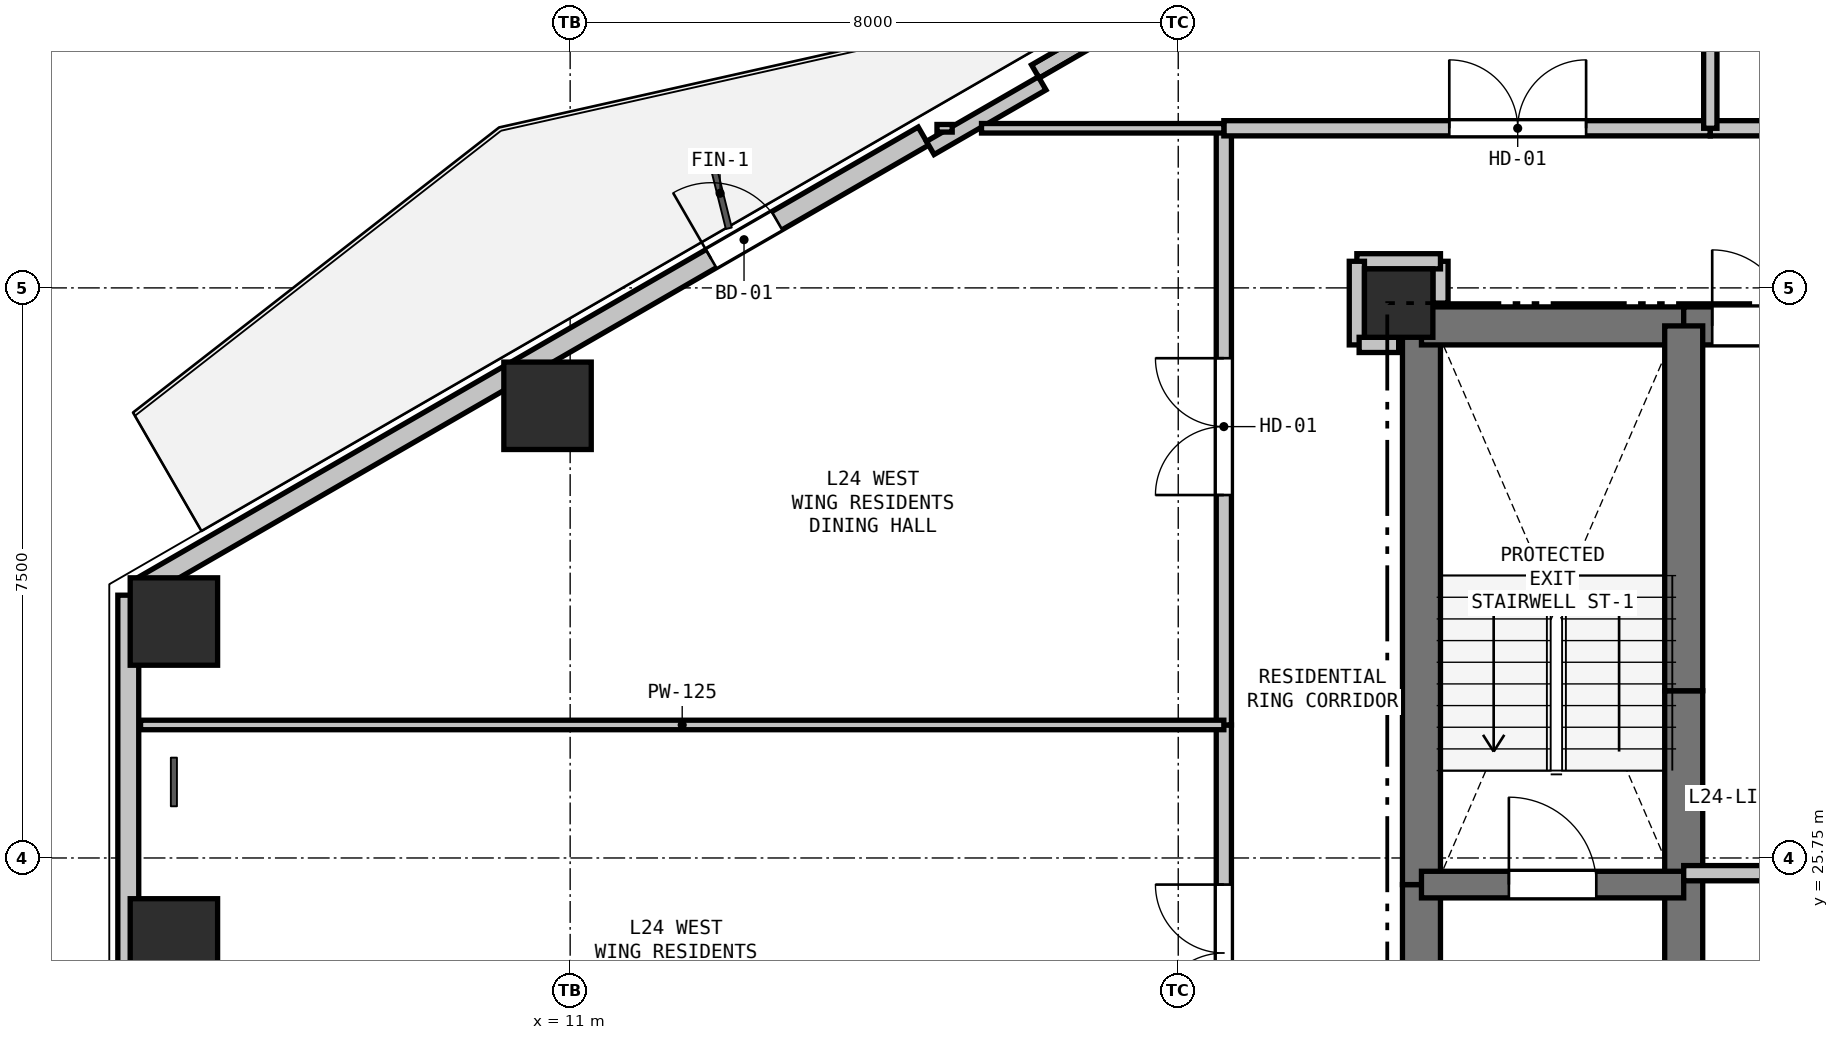
"""IFC4 building model, lengths in metres.
Left out: names, types, materials, properties, quantities, classifications, styles, units other than length and angle.
Written with IfcOpenShell. Run it as: python <this file> out.ifc"""

import sys

from ifc_helpers import new_model, si_unit, direction, frame, frame_2d, origin, origin_2d, place, context, subcontext, project, spatial, rectangle, hollow_rectangle, extrude, element, fill, save


model = new_model("IFC4")
c1 = context("Model", 3, precision=1e-05, world=origin(), true_north=direction((0.0, 1.0)))
c2 = subcontext(c1, "Body", "Model", "MODEL_VIEW")
j1 = project(units=[si_unit("LENGTHUNIT", "METRE"), si_unit("PLANEANGLEUNIT", "RADIAN")], contexts=[c1])
p1 = place(None, origin())
s1 = spatial("IfcSite", under=j1, at=p1, CompositionType="ELEMENT")
p2 = place(p1, origin())
s2 = spatial("IfcBuilding", under=s1, at=p2, CompositionType="ELEMENT")
p3 = place(p2, frame((0.0, 0.0, 90.0)))
s3 = spatial("IfcBuildingStorey", under=s2, at=p3, CompositionType="ELEMENT", Elevation=90.0)
p4 = place(p3, frame((21.9, 33.05, 0.0), z_axis=(0.0, 0.0, 1.0), x_axis=(1.0, 0.0, 0.0)))
e1 = element("IfcColumn", 1, at=p4, inside=s3, PredefinedType="COLUMN", context=c2, shape_type="SweptSolid", body=[
    extrude(rectangle(XDim=0.9, YDim=0.9, at=origin_2d()), origin(), (0.0, 0.0, 1.0), 3.3),
])
for number, where, z_axis, x_axis in (
    (2, (5.787, 28.861, 0.0), (0.0, 0.0, 1.0), (1.0, 0.0, 0.0)),
    (3, (10.702, 31.699, 0.0), (0.0, 0.0, 1.0), (1.0, 0.0, 0.0)),
    (4, (5.787, 24.639, 0.0), (0.0, 0.0, 1.0), (1.0, 0.0, 0.0)),
):
    element("IfcColumn", number, at=place(p3, frame(where, z_axis=z_axis, x_axis=x_axis)), inside=s3, PredefinedType="COLUMN", context=c2, shape_type="SweptSolid", body=[
        extrude(hollow_rectangle(XDim=1.15, YDim=1.15, WallThickness=0.032, at=origin_2d()), origin(), (0.0, 0.0, 1.0), 3.3),
    ])
p5 = place(p3, frame((5.187, 24.293, 0.0), z_axis=(0.0, 0.0, 1.0), x_axis=(0.0, 1.0, 0.0)))
e5 = element("IfcWall", 5, at=p5, inside=s3, PredefinedType="SOLIDWALL", context=c2, shape_type="SweptSolid", body=[
    extrude(rectangle(XDim=4.915, YDim=0.275, at=frame_2d((2.457, 0.0))), origin(), (0.0, 0.0, 1.0), 2.67),
])
p6 = place(p3, frame((5.317, 29.282, 0.0), z_axis=(0.0, 0.0, 1.0), x_axis=(0.866023023012, 0.500004123596, 0.0)))
e6 = element("IfcWall", 6, at=p6, inside=s3, PredefinedType="SOLIDWALL", context=c2, shape_type="SweptSolid", body=[
    extrude(rectangle(XDim=11.93, YDim=0.275, at=frame_2d((5.965, 0.0))), origin(), (0.0, 0.0, 1.0), 2.67),
])
p7 = place(p6, frame((8.704, 0.0, 0.0)))
e7 = element("IfcOpeningElement", 7, at=p7, cuts=e6, PredefinedType="OPENING", context=c2, shape_type="SweptSolid", body=[
    extrude(rectangle(XDim=1.0, YDim=2.1, at=frame_2d((0.5, 1.05))), frame((0.0, 0.147, 0.0), z_axis=(0.0, -1.0, 0.0), x_axis=(1.0, 0.0, 0.0)), (0.0, 0.0, 1.0), 0.295),
])
p8 = place(p3, frame((17.12, 36.097, 0.0), z_axis=(0.0, 0.0, 1.0), x_axis=(0.866027010039, 0.499997217876, 0.0)))
e8 = element("IfcWall", 8, at=p8, inside=s3, PredefinedType="PARAPET", context=c2, shape_type="SweptSolid", body=[
    extrude(rectangle(XDim=11.229, YDim=0.2, at=frame_2d((5.615, 0.0))), origin(), (0.0, 0.0, 1.0), 0.2),
])
p9 = place(p3, frame((15.738, 35.091, 0.0), z_axis=(0.0, 0.0, 1.0), x_axis=(0.866025371046, 0.500000056704, 0.0)))
e9 = element("IfcWall", 9, at=p9, inside=s3, PredefinedType="PARAPET", context=c2, shape_type="SweptSolid", body=[
    extrude(rectangle(XDim=1.7, YDim=0.2, at=frame_2d((0.85, 0.0))), origin(), (0.0, 0.0, 1.0), 2.67),
])
p10 = place(p3, frame((22.2, 20.75, 0.0), z_axis=(0.0, 0.0, 1.0), x_axis=(0.0, 1.0, 0.0)))
e10 = element("IfcWall", 10, at=p10, inside=s3, PredefinedType="SHEAR", context=c2, shape_type="SweptSolid", body=[
    extrude(rectangle(XDim=4.65, YDim=0.5, at=frame_2d((2.325, 0.0))), origin(), (0.0, 0.0, 1.0), 3.05),
])
p11 = place(p3, frame((22.2, 25.4, 0.0), z_axis=(0.0, 0.0, 1.0), x_axis=(0.0, 1.0, 0.0)))
e11 = element("IfcWall", 11, at=p11, inside=s3, PredefinedType="SHEAR", context=c2, shape_type="SweptSolid", body=[
    extrude(rectangle(XDim=7.35, YDim=0.5, at=frame_2d((3.675, 0.0))), origin(), (0.0, 0.0, 1.0), 3.05),
])
p12 = place(p3, frame((22.2, 32.75, 0.0), z_axis=(0.0, 0.0, 1.0), x_axis=(1.0, 0.0, 0.0)))
e12 = element("IfcWall", 12, at=p12, inside=s3, PredefinedType="SHEAR", context=c2, shape_type="SweptSolid", body=[
    extrude(rectangle(XDim=3.45, YDim=0.5, at=frame_2d((1.725, 0.0))), origin(), (0.0, 0.0, 1.0), 3.05),
])
p13 = place(p3, frame((25.65, 32.75, 0.0), z_axis=(0.0, 0.0, 1.0), x_axis=(1.0, 0.0, 0.0)))
e13 = element("IfcWall", 13, at=p13, inside=s3, PredefinedType="SHEAR", context=c2, shape_type="SweptSolid", body=[
    extrude(rectangle(XDim=1.75, YDim=0.5, at=frame_2d((0.875, 0.0))), origin(), (0.0, 0.0, 1.0), 3.05),
])
p14 = place(p13, frame((0.375, 0.0, 0.0)))
e14 = element("IfcOpeningElement", 14, at=p14, cuts=e13, PredefinedType="OPENING", context=c2, shape_type="SweptSolid", body=[
    extrude(rectangle(XDim=1.0, YDim=2.15, at=frame_2d((0.5, 1.075))), frame((0.0, 0.26, 0.0), z_axis=(0.0, -1.0, 0.0), x_axis=(1.0, 0.0, 0.0)), (0.0, 0.0, 1.0), 0.52),
])
p15 = place(p3, frame((25.65, 22.75, 0.0), z_axis=(0.0, 0.0, 1.0), x_axis=(0.0, 1.0, 0.0)))
e15 = element("IfcWall", 15, at=p15, inside=s3, PredefinedType="SHEAR", context=c2, shape_type="SweptSolid", body=[
    extrude(rectangle(XDim=2.8, YDim=0.5, at=frame_2d((1.4, 0.0))), origin(), (0.0, 0.0, 1.0), 3.05),
])
p16 = place(p3, frame((25.65, 25.55, 0.0), z_axis=(0.0, 0.0, 1.0), x_axis=(0.0, 1.0, 0.0)))
e16 = element("IfcWall", 16, at=p16, inside=s3, PredefinedType="SHEAR", context=c2, shape_type="SweptSolid", body=[
    extrude(rectangle(XDim=2.4, YDim=0.5, at=frame_2d((1.2, 0.0))), origin(), (0.0, 0.0, 1.0), 3.05),
])
p17 = place(p3, frame((25.65, 27.95, 0.0), z_axis=(0.0, 0.0, 1.0), x_axis=(0.0, 1.0, 0.0)))
e17 = element("IfcWall", 17, at=p17, inside=s3, PredefinedType="SHEAR", context=c2, shape_type="SweptSolid", body=[
    extrude(rectangle(XDim=4.8, YDim=0.5, at=frame_2d((2.4, 0.0))), origin(), (0.0, 0.0, 1.0), 3.05),
])
p18 = place(p3, frame((22.2, 25.4, 0.0), z_axis=(0.0, 0.0, 1.0), x_axis=(1.0, 0.0, 0.0)))
e18 = element("IfcWall", 18, at=p18, inside=s3, PredefinedType="SHEAR", context=c2, shape_type="SweptSolid", body=[
    extrude(rectangle(XDim=3.45, YDim=0.35, at=frame_2d((1.725, 0.0))), origin(), (0.0, 0.0, 1.0), 3.05),
])
p19 = place(p18, frame((1.15, 0.0, 0.0)))
e19 = element("IfcOpeningElement", 19, at=p19, cuts=e18, PredefinedType="OPENING", context=c2, shape_type="SweptSolid", body=[
    extrude(rectangle(XDim=1.15, YDim=2.15, at=frame_2d((0.575, 1.075))), frame((0.0, 0.185, 0.0), z_axis=(0.0, -1.0, 0.0), x_axis=(1.0, 0.0, 0.0)), (0.0, 0.0, 1.0), 0.37),
])
p20 = place(p3, frame((25.65, 25.55, 0.0), z_axis=(0.0, 0.0, 1.0), x_axis=(1.0, 0.0, 0.0)))
e20 = element("IfcWall", 20, at=p20, inside=s3, PredefinedType="PARTITIONING", context=c2, shape_type="SweptSolid", body=[
    extrude(rectangle(XDim=4.95, YDim=0.2, at=frame_2d((2.475, 0.0))), origin(), (0.0, 0.0, 1.0), 3.05),
])
p21 = place(p3, frame((19.6, 21.5, 0.0), z_axis=(0.0, 0.0, 1.0), x_axis=(0.0, 1.0, 0.0)))
e21 = element("IfcWall", 21, at=p21, inside=s3, PredefinedType="PARTITIONING", context=c2, shape_type="SweptSolid", body=[
    extrude(rectangle(XDim=6.0, YDim=0.2, at=frame_2d((3.0, 0.0))), origin(), (0.0, 0.0, 1.0), 3.05),
])
p22 = place(p21, frame((2.1, 0.0, 0.0)))
e22 = element("IfcOpeningElement", 22, at=p22, cuts=e21, PredefinedType="OPENING", context=c2, shape_type="SweptSolid", body=[
    extrude(rectangle(XDim=1.8, YDim=2.2, at=frame_2d((0.9, 1.1))), frame((0.0, 0.11, 0.0), z_axis=(0.0, -1.0, 0.0), x_axis=(1.0, 0.0, 0.0)), (0.0, 0.0, 1.0), 0.22),
])
p23 = place(p3, frame((19.6, 27.5, 0.0), z_axis=(0.0, 0.0, 1.0), x_axis=(0.0, 1.0, 0.0)))
e23 = element("IfcWall", 23, at=p23, inside=s3, PredefinedType="PARTITIONING", context=c2, shape_type="SweptSolid", body=[
    extrude(rectangle(XDim=7.85, YDim=0.2, at=frame_2d((3.925, 0.0))), origin(), (0.0, 0.0, 1.0), 2.423),
])
p24 = place(p23, frame((3.025, 0.0, 0.0)))
e24 = element("IfcOpeningElement", 24, at=p24, cuts=e23, PredefinedType="OPENING", context=c2, shape_type="SweptSolid", body=[
    extrude(rectangle(XDim=1.8, YDim=2.2, at=frame_2d((0.9, 1.1))), frame((0.0, 0.11, 0.0), z_axis=(0.0, -1.0, 0.0), x_axis=(1.0, 0.0, 0.0)), (0.0, 0.0, 1.0), 0.22),
])
p25 = place(p3, frame((19.6, 35.35, 0.0), z_axis=(0.0, 0.0, 1.0), x_axis=(1.0, 0.0, 0.0)))
e25 = element("IfcWall", 25, at=p25, inside=s3, PredefinedType="PARTITIONING", context=c2, shape_type="SweptSolid", body=[
    extrude(rectangle(XDim=6.4, YDim=0.2, at=frame_2d((3.2, 0.0))), origin(), (0.0, 0.0, 1.0), 3.05),
])
p26 = place(p25, frame((2.966, 0.0, 0.0)))
e26 = element("IfcOpeningElement", 26, at=p26, cuts=e25, PredefinedType="OPENING", context=c2, shape_type="SweptSolid", body=[
    extrude(rectangle(XDim=1.8, YDim=2.2, at=frame_2d((0.9, 1.1))), frame((0.0, 0.11, 0.0), z_axis=(0.0, -1.0, 0.0), x_axis=(1.0, 0.0, 0.0)), (0.0, 0.0, 1.0), 0.22),
])
p27 = place(p3, frame((26.0, 35.35, 0.0), z_axis=(0.0, 0.0, 1.0), x_axis=(1.0, 0.0, 0.0)))
e27 = element("IfcWall", 27, at=p27, inside=s3, PredefinedType="PARTITIONING", context=c2, shape_type="SweptSolid", body=[
    extrude(rectangle(XDim=2.2, YDim=0.2, at=frame_2d((1.1, 0.0))), origin(), (0.0, 0.0, 1.0), 3.05),
])
p28 = place(p27, frame((0.675, 0.0, 0.0)))
e28 = element("IfcOpeningElement", 28, at=p28, cuts=e27, PredefinedType="OPENING", context=c2, shape_type="SweptSolid", body=[
    extrude(rectangle(XDim=0.85, YDim=2.1, at=frame_2d((0.425, 1.05))), frame((0.0, 0.11, 0.0), z_axis=(0.0, -1.0, 0.0), x_axis=(1.0, 0.0, 0.0)), (0.0, 0.0, 1.0), 0.22),
])
p29 = place(p3, frame((22.45, 33.05, 0.0), z_axis=(0.0, 0.0, 1.0), x_axis=(0.0, 1.0, 0.0)))
e29 = element("IfcWall", 29, at=p29, inside=s3, PredefinedType="PARTITIONING", context=c2, shape_type="SweptSolid", body=[
    extrude(rectangle(XDim=0.55, YDim=0.2, at=frame_2d((0.275, 0.0))), origin(), (0.0, 0.0, 1.0), 2.498),
])
p30 = place(p3, frame((22.45, 33.6, 0.0), z_axis=(0.0, 0.0, 1.0), x_axis=(-1.0, 0.0, 0.0)))
e30 = element("IfcWall", 30, at=p30, inside=s3, PredefinedType="PARTITIONING", context=c2, shape_type="SweptSolid", body=[
    extrude(rectangle(XDim=1.1, YDim=0.2, at=frame_2d((0.55, 0.0))), origin(), (0.0, 0.0, 1.0), 3.05),
])
p31 = place(p3, frame((21.35, 33.6, 0.0), z_axis=(0.0, 0.0, 1.0), x_axis=(0.0, -1.0, 0.0)))
e31 = element("IfcWall", 31, at=p31, inside=s3, PredefinedType="PARTITIONING", context=c2, shape_type="SweptSolid", body=[
    extrude(rectangle(XDim=1.1, YDim=0.2, at=frame_2d((0.55, 0.0))), origin(), (0.0, 0.0, 1.0), 2.423),
])
p32 = place(p3, frame((21.38, 32.5, 0.0), z_axis=(0.0, 0.0, 1.0), x_axis=(1.0, 0.0, 0.0)))
e32 = element("IfcWall", 32, at=p32, inside=s3, PredefinedType="PARTITIONING", context=c2, shape_type="SweptSolid", body=[
    extrude(rectangle(XDim=0.52, YDim=0.2, at=frame_2d((0.26, 0.0))), origin(), (0.0, 0.0, 1.0), 2.498),
])
p33 = place(p3, frame((26.0, 35.35, 0.0), z_axis=(0.0, 0.0, 1.0), x_axis=(0.0, 1.0, 0.0)))
e33 = element("IfcWall", 33, at=p33, inside=s3, PredefinedType="PLUMBINGWALL", context=c2, shape_type="SweptSolid", body=[
    extrude(rectangle(XDim=2.3, YDim=0.175, at=frame_2d((1.15, 0.0))), origin(), (0.0, 0.0, 1.0), 3.05),
])
p34 = place(p3, frame((19.6, 35.35, 0.0), z_axis=(0.0, 0.0, 1.0), x_axis=(-1.0, 0.0, 0.0)))
e34 = element("IfcWall", 34, at=p34, inside=s3, PredefinedType="PARTITIONING", context=c2, shape_type="SweptSolid", body=[
    extrude(rectangle(XDim=3.188, YDim=0.125, at=frame_2d((1.594, 0.0))), origin(), (0.0, 0.0, 1.0), 2.365),
])
p35 = place(p3, frame((16.026, 35.35, 0.0), z_axis=(0.0, 0.0, 1.0), x_axis=(-1.0, 0.0, 0.0)))
e35 = element("IfcWall", 35, at=p35, inside=s3, PredefinedType="PARTITIONING", context=c2, shape_type="SweptSolid", body=[
    extrude(rectangle(XDim=0.2, YDim=0.1, at=frame_2d((0.1, 0.0))), origin(), (0.0, 0.0, 1.0), 3.05),
])
p36 = place(p3, frame((19.6, 27.5, 0.0), z_axis=(0.0, 0.0, 1.0), x_axis=(-1.0, 0.0, 0.0)))
e36 = element("IfcWall", 36, at=p36, inside=s3, PredefinedType="PARTITIONING", context=c2, shape_type="SweptSolid", body=[
    extrude(rectangle(XDim=14.252, YDim=0.125, at=frame_2d((7.126, 0.0))), origin(), (0.0, 0.0, 1.0), 2.66),
])
p37 = place(p7, origin())
e37 = element("IfcDoor", 37, at=p37, inside=s3, OperationType="SINGLE_SWING_LEFT", PredefinedType="DOOR", context=c2, shape_type="SweptSolid", body=[
    extrude(rectangle(XDim=1.0, YDim=2.1, at=frame_2d((0.5, 1.05))), frame((0.0, 0.025, 0.0), z_axis=(0.0, -1.0, 0.0), x_axis=(1.0, 0.0, 0.0)), (0.0, 0.0, 1.0), 0.05),
])
fill(e7, e37)
p38 = place(p14, origin())
e38 = element("IfcDoor", 38, at=p38, inside=s3, OperationType="SINGLE_SWING_LEFT", PredefinedType="DOOR", context=c2, shape_type="SweptSolid", body=[
    extrude(rectangle(XDim=1.0, YDim=2.15, at=frame_2d((0.5, 1.075))), frame((0.0, 0.025, 0.0), z_axis=(0.0, -1.0, 0.0), x_axis=(1.0, 0.0, 0.0)), (0.0, 0.0, 1.0), 0.05),
])
fill(e14, e38)
p39 = place(p19, origin())
e39 = element("IfcDoor", 39, at=p39, inside=s3, OperationType="SINGLE_SWING_LEFT", PredefinedType="DOOR", context=c2, shape_type="SweptSolid", body=[
    extrude(rectangle(XDim=1.15, YDim=2.15, at=frame_2d((0.575, 1.075))), frame((0.0, 0.025, 0.0), z_axis=(0.0, -1.0, 0.0), x_axis=(1.0, 0.0, 0.0)), (0.0, 0.0, 1.0), 0.05),
])
fill(e19, e39)
p40 = place(p26, origin())
e40 = element("IfcDoor", 40, at=p40, inside=s3, OperationType="DOUBLE_DOOR_SINGLE_SWING", PredefinedType="DOOR", context=c2, shape_type="SweptSolid", body=[
    extrude(rectangle(XDim=1.8, YDim=2.2, at=frame_2d((0.9, 1.1))), frame((0.0, 0.025, 0.0), z_axis=(0.0, -1.0, 0.0), x_axis=(1.0, 0.0, 0.0)), (0.0, 0.0, 1.0), 0.05),
])
fill(e26, e40)
p41 = place(p24, origin())
e41 = element("IfcDoor", 41, at=p41, inside=s3, OperationType="DOUBLE_DOOR_SINGLE_SWING", PredefinedType="DOOR", context=c2, shape_type="SweptSolid", body=[
    extrude(rectangle(XDim=1.8, YDim=2.2, at=frame_2d((0.9, 1.1))), frame((0.0, 0.025, 0.0), z_axis=(0.0, -1.0, 0.0), x_axis=(1.0, 0.0, 0.0)), (0.0, 0.0, 1.0), 0.05),
])
fill(e24, e41)
p42 = place(p22, origin())
e42 = element("IfcDoor", 42, at=p42, inside=s3, OperationType="DOUBLE_DOOR_SINGLE_SWING", PredefinedType="DOOR", context=c2, shape_type="SweptSolid", body=[
    extrude(rectangle(XDim=1.8, YDim=2.2, at=frame_2d((0.9, 1.1))), frame((0.0, 0.025, 0.0), z_axis=(0.0, -1.0, 0.0), x_axis=(1.0, 0.0, 0.0)), (0.0, 0.0, 1.0), 0.05),
])
fill(e22, e42)
save(model, sys.argv[1])
